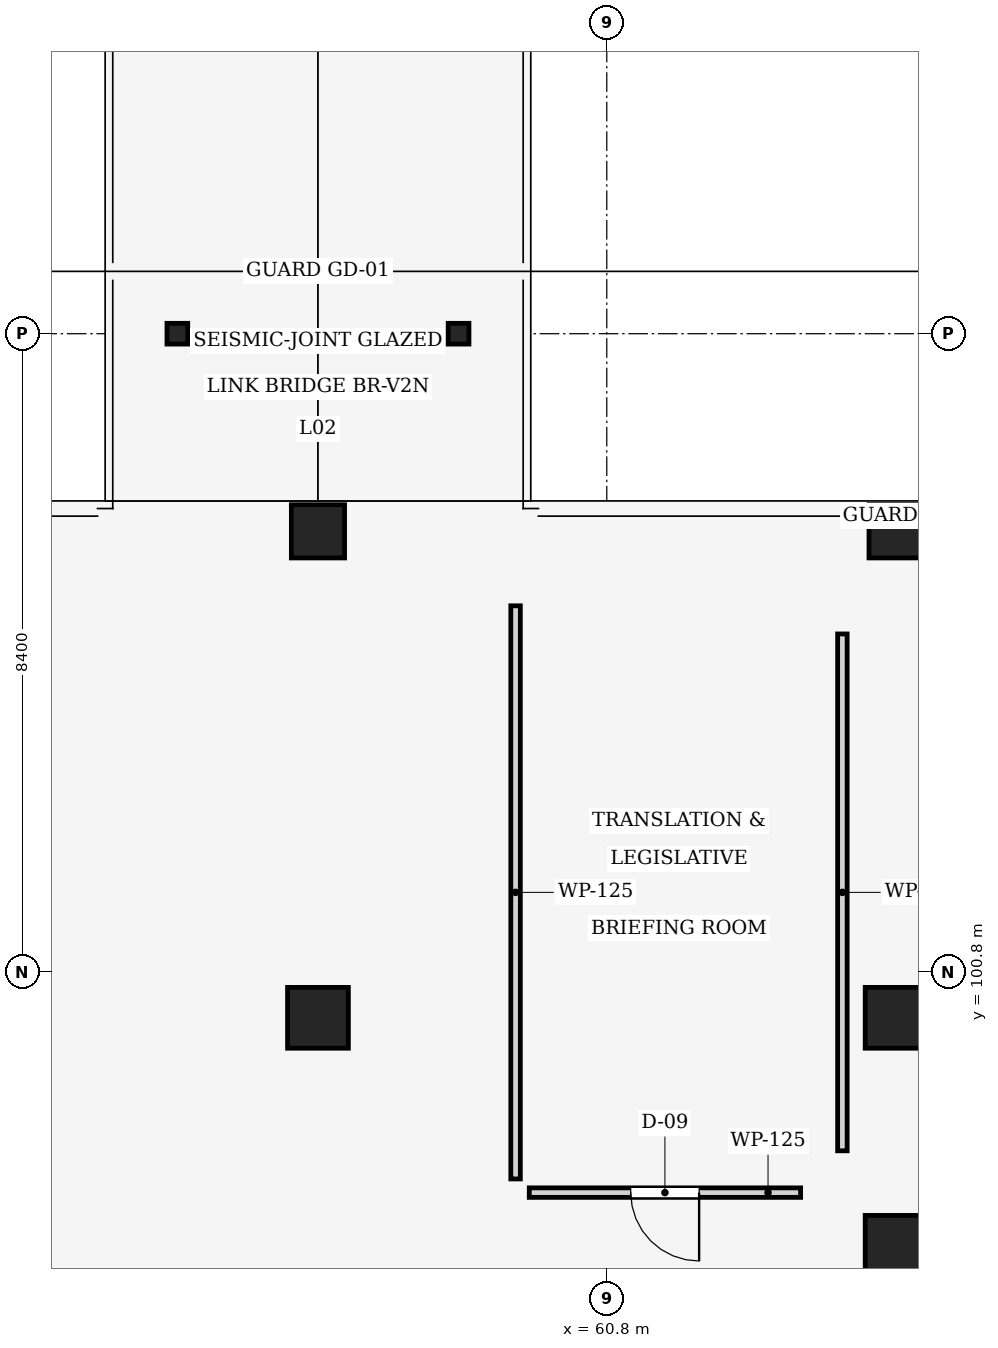
"""IFC4 building model, lengths in metres.
Left out: names, types, materials, properties, quantities, classifications, styles, units other than length and angle.
Written with IfcOpenShell. Run it as: python <this file> out.ifc"""

import sys

from ifc_helpers import new_model, si_unit, direction, frame, frame_2d, origin, origin_2d, place, context, subcontext, project, spatial, rectangle, hollow_circle, extrude, element, fill, save


model = new_model("IFC4")
c1 = context("Model", 3, precision=1e-05, world=origin(), true_north=direction((0.0, 1.0)))
c2 = subcontext(c1, "Body", "Model", "MODEL_VIEW")
j1 = project(units=[si_unit("LENGTHUNIT", "METRE"), si_unit("PLANEANGLEUNIT", "RADIAN")], contexts=[c1])
p1 = place(None, origin())
s1 = spatial("IfcSite", under=j1, at=p1, CompositionType="ELEMENT")
p2 = place(p1, origin())
s2 = spatial("IfcBuilding", under=s1, at=p2, CompositionType="ELEMENT")
p3 = place(p2, frame((0.0, 0.0, 9.15)))
s3 = spatial("IfcBuildingStorey", under=s2, at=p3, CompositionType="ELEMENT", Elevation=9.15)
for number, where, z_axis, x_axis in (
    (1, (64.6, 97.2, 0.0), (0.0, 0.0, 1.0), (1.0, 0.0, 0.0)),
    (2, (57.0, 100.2, 0.0), (0.0, 0.0, 1.0), (1.0, 0.0, 0.0)),
    (3, (64.6, 100.2, 0.0), (0.0, 0.0, 1.0), (1.0, 0.0, 0.0)),
):
    element("IfcColumn", number, at=place(p3, frame(where, z_axis=z_axis, x_axis=x_axis)), inside=s3, PredefinedType="COLUMN", context=c2, shape_type="SweptSolid", body=[
        extrude(rectangle(XDim=0.8, YDim=0.8, at=origin_2d()), origin(), (0.0, 0.0, 1.0), 4.05),
    ])
for number, where, z_axis, x_axis in (
    (4, (57.0, 106.6, 0.0), (0.0, 0.0, 1.0), (1.0, 0.0, 0.0)),
    (5, (64.6, 106.6, 0.0), (0.0, 0.0, 1.0), (1.0, 0.0, 0.0)),
):
    element("IfcColumn", number, at=place(p3, frame(where, z_axis=z_axis, x_axis=x_axis)), inside=s3, PredefinedType="COLUMN", context=c2, shape_type="SweptSolid", body=[
        extrude(rectangle(XDim=0.7, YDim=0.7, at=origin_2d()), origin(), (0.0, 0.0, 1.0), 4.05),
    ])
for number, where, z_axis, x_axis in (
    (6, (55.15, 109.2, 0.0), (0.0, 0.0, 1.0), (1.0, 0.0, 0.0)),
    (7, (58.85, 109.2, 0.0), (0.0, 0.0, 1.0), (1.0, 0.0, 0.0)),
):
    element("IfcColumn", number, at=place(p3, frame(where, z_axis=z_axis, x_axis=x_axis)), inside=s3, PredefinedType="COLUMN", context=c2, shape_type="SweptSolid", body=[
        extrude(hollow_circle(Radius=0.136, WallThickness=0.016, at=origin_2d()), origin(), (0.0, 0.0, 1.0), 3.82),
    ])
p4 = place(p3, frame((63.35, 97.9, 0.0), z_axis=(0.0, 0.0, 1.0), x_axis=(-1.0, 0.0, 0.0)))
e8 = element("IfcWall", 8, at=p4, inside=s3, PredefinedType="PARTITIONING", context=c2, shape_type="SweptSolid", body=[
    extrude(rectangle(XDim=3.57, YDim=0.125, at=frame_2d((1.785, 0.0))), origin(), (0.0, 0.0, 1.0), 3.7),
])
p5 = place(p4, frame((1.335, 0.0, 0.0)))
e9 = element("IfcOpeningElement", 9, at=p5, cuts=e8, PredefinedType="OPENING", context=c2, shape_type="SweptSolid", body=[
    extrude(rectangle(XDim=0.9, YDim=2.22, at=frame_2d((0.45, 1.11))), frame((0.0, 0.073, 0.0), z_axis=(0.0, -1.0, 0.0), x_axis=(1.0, 0.0, 0.0)), (0.0, 0.0, 1.0), 0.145),
])
p6 = place(p3, frame((59.6, 98.08, 0.0), z_axis=(0.0, 0.0, 1.0), x_axis=(0.0, 1.0, 0.0)))
e10 = element("IfcWall", 10, at=p6, inside=s3, PredefinedType="PARTITIONING", context=c2, shape_type="SweptSolid", body=[
    extrude(rectangle(XDim=7.54, YDim=0.125, at=frame_2d((3.77, 0.0))), origin(), (0.0, 0.0, 1.0), 3.165),
])
p7 = place(p3, frame((63.9, 105.25, 0.0), z_axis=(0.0, 0.0, 1.0), x_axis=(0.0, -1.0, 0.0)))
e11 = element("IfcWall", 11, at=p7, inside=s3, PredefinedType="PARTITIONING", context=c2, shape_type="SweptSolid", body=[
    extrude(rectangle(XDim=6.8, YDim=0.125, at=frame_2d((3.4, 0.0))), origin(), (0.0, 0.0, 1.0), 3.165),
])
p8 = place(p5, origin())
e12 = element("IfcDoor", 12, at=p8, inside=s3, OperationType="SINGLE_SWING_LEFT", PredefinedType="DOOR", context=c2, shape_type="SweptSolid", body=[
    extrude(rectangle(XDim=0.9, YDim=2.22, at=frame_2d((0.45, 1.11))), frame((0.0, 0.025, 0.0), z_axis=(0.0, -1.0, 0.0), x_axis=(1.0, 0.0, 0.0)), (0.0, 0.0, 1.0), 0.05),
])
fill(e9, e12)
save(model, sys.argv[1])
